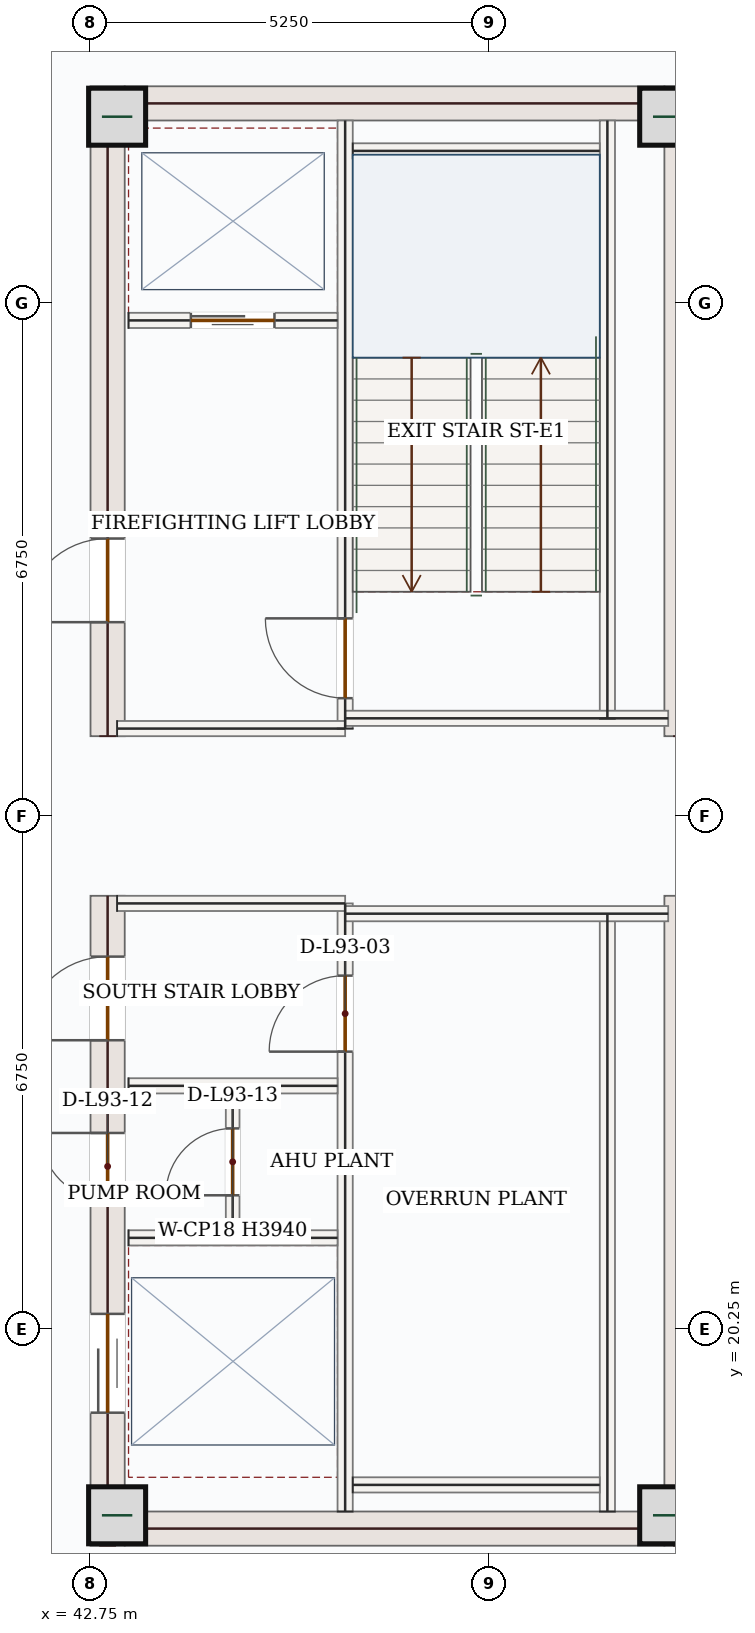
"""IFC4 building model, lengths in metres.
Left out: names, types, materials, properties, quantities, classifications, styles, units other than length and angle.
Written with IfcOpenShell. Run it as: python <this file> out.ifc"""

import sys

from ifc_helpers import new_model, si_unit, direction, frame, frame_2d, origin, origin_2d, place, context, subcontext, project, spatial, rectangle, extrude, source, transform, mapped, element, fill, save


model = new_model("IFC4")
c1 = context("Model", 3, precision=1e-05, world=origin(), true_north=direction((0.0, 1.0)))
c2 = subcontext(c1, "Body", "Model", "MODEL_VIEW")
j1 = project(units=[si_unit("LENGTHUNIT", "METRE"), si_unit("PLANEANGLEUNIT", "RADIAN")], contexts=[c1])
p1 = place(None, origin())
s1 = spatial("IfcSite", under=j1, at=p1, CompositionType="ELEMENT")
p2 = place(p1, origin())
s2 = spatial("IfcBuilding", under=s1, at=p2, CompositionType="ELEMENT")
p3 = place(p2, frame((0.0, 0.0, 383.85)))
s3 = spatial("IfcBuildingStorey", under=s2, at=p3, CompositionType="ELEMENT", Elevation=383.85)
p4 = place(p3, frame((42.975, 17.4, 0.0), z_axis=(0.0, 0.0, 1.0), x_axis=(0.0, 1.0, 0.0)))
e1 = element("IfcWall", 1, at=p4, inside=s3, PredefinedType="SHEAR", context=c2, shape_type="SweptSolid", body=[
    extrude(rectangle(XDim=8.55, YDim=0.45, at=frame_2d((4.275, 0.0))), origin(), (0.0, 0.0, 1.0), 3.94),
])
p5 = place(p4, frame((6.65, 0.0, 0.0)))
e2 = element("IfcOpeningElement", 2, at=p5, cuts=e1, PredefinedType="OPENING", context=c2, shape_type="SweptSolid", body=[
    extrude(rectangle(XDim=1.1, YDim=2.2, at=frame_2d((0.55, 1.1))), frame((0.0, 0.235, 0.0), z_axis=(0.0, -1.0, 0.0), x_axis=(1.0, 0.0, 0.0)), (0.0, 0.0, 1.0), 0.47),
])
p6 = place(p4, frame((1.75, 0.0, 0.0)))
e3 = element("IfcOpeningElement", 3, at=p6, cuts=e1, PredefinedType="OPENING", context=c2, shape_type="SweptSolid", body=[
    extrude(rectangle(XDim=1.3, YDim=2.2, at=frame_2d((0.65, 1.1))), frame((0.0, 0.235, 0.0), z_axis=(0.0, -1.0, 0.0), x_axis=(1.0, 0.0, 0.0)), (0.0, 0.0, 1.0), 0.47),
])
p7 = place(p4, frame((4.55, 0.0, 0.0)))
e4 = element("IfcOpeningElement", 4, at=p7, cuts=e1, PredefinedType="OPENING", context=c2, shape_type="SweptSolid", body=[
    extrude(rectangle(XDim=0.88, YDim=2.1, at=frame_2d((0.44, 1.05))), frame((0.0, 0.235, 0.0), z_axis=(0.0, -1.0, 0.0), x_axis=(1.0, 0.0, 0.0)), (0.0, 0.0, 1.0), 0.47),
])
p8 = place(p3, frame((42.975, 28.05, 0.0), z_axis=(0.0, 0.0, 1.0), x_axis=(0.0, 1.0, 0.0)))
e5 = element("IfcWall", 5, at=p8, inside=s3, PredefinedType="SHEAR", context=c2, shape_type="SweptSolid", body=[
    extrude(rectangle(XDim=8.55, YDim=0.45, at=frame_2d((4.275, 0.0))), origin(), (0.0, 0.0, 1.0), 3.94),
])
p9 = place(p8, frame((1.5, 0.0, 0.0)))
e6 = element("IfcOpeningElement", 6, at=p9, cuts=e5, PredefinedType="OPENING", context=c2, shape_type="SweptSolid", body=[
    extrude(rectangle(XDim=1.1, YDim=2.2, at=frame_2d((0.55, 1.1))), frame((0.0, 0.235, 0.0), z_axis=(0.0, -1.0, 0.0), x_axis=(1.0, 0.0, 0.0)), (0.0, 0.0, 1.0), 0.47),
])
m1 = source(origin(), c2, "Body", "SweptSolid", [
    extrude(rectangle(XDim=8.55, YDim=0.45, at=frame_2d((4.275, 0.0))), origin(), (0.0, 0.0, 1.0), 3.94),
])
for number, where, z_axis, x_axis in (
    (7, (50.525, 17.4, 0.0), (0.0, 0.0, 1.0), (0.0, 1.0, 0.0)),
    (8, (50.525, 28.05, 0.0), (0.0, 0.0, 1.0), (0.0, 1.0, 0.0)),
):
    element("IfcWall", number, at=place(p3, frame(where, z_axis=z_axis, x_axis=x_axis)), inside=s3, PredefinedType="SHEAR", context=c2, shape_type="MappedRepresentation", body=[
        mapped(m1, transform((0.0, 0.0, 0.0), x_axis=(1.0, 0.0, 0.0), y_axis=(0.0, 1.0, 0.0), z_axis=(0.0, 0.0, 1.0), scale=1.0)),
    ])
m2 = source(origin(), c2, "Body", "SweptSolid", [
    extrude(rectangle(XDim=7.1, YDim=0.45, at=frame_2d((3.55, 0.0))), origin(), (0.0, 0.0, 1.0), 3.94),
])
for number, where, z_axis, x_axis in (
    (9, (43.2, 17.625, 0.0), (0.0, 0.0, 1.0), (1.0, 0.0, 0.0)),
    (10, (43.2, 36.375, 0.0), (0.0, 0.0, 1.0), (1.0, 0.0, 0.0)),
):
    element("IfcWall", number, at=place(p3, frame(where, z_axis=z_axis, x_axis=x_axis)), inside=s3, PredefinedType="SHEAR", context=c2, shape_type="MappedRepresentation", body=[
        mapped(m2, transform((0.0, 0.0, 0.0), x_axis=(1.0, 0.0, 0.0), y_axis=(0.0, 1.0, 0.0), z_axis=(0.0, 0.0, 1.0), scale=1.0)),
    ])
m3 = source(origin(), c2, "Body", "SweptSolid", [
    extrude(rectangle(XDim=0.75, YDim=0.75, at=origin_2d()), origin(), (0.0, 0.0, 1.0), 4.2),
])
for number, where, z_axis, x_axis in (
    (11, (43.1, 17.8, 0.0), (0.0, 0.0, 1.0), (1.0, 0.0, 0.0)),
    (12, (50.35, 17.8, 0.0), (0.0, 0.0, 1.0), (1.0, 0.0, 0.0)),
    (13, (43.1, 36.2, 0.0), (0.0, 0.0, 1.0), (1.0, 0.0, 0.0)),
    (14, (50.35, 36.2, 0.0), (0.0, 0.0, 1.0), (1.0, 0.0, 0.0)),
):
    element("IfcColumn", number, at=place(p3, frame(where, z_axis=z_axis, x_axis=x_axis)), inside=s3, PredefinedType="COLUMN", context=c2, shape_type="MappedRepresentation", body=[
        mapped(m3, transform((0.0, 0.0, 0.0), x_axis=(1.0, 0.0, 0.0), y_axis=(0.0, 1.0, 0.0), z_axis=(0.0, 0.0, 1.0), scale=1.0)),
    ])
m4 = source(origin(), c2, "Body", "SweptSolid", [
    extrude(rectangle(XDim=5.258, YDim=0.26, at=frame_2d((2.629, 0.0))), origin(), (0.0, 0.0, 1.0), 3.94),
])
for number, where, z_axis, x_axis in (
    (15, (49.342, 39.26, 0.0), (0.0, 0.0, 1.0), (0.707, -0.707, 0.0)),
    (16, (53.06, 18.458, 0.0), (0.0, 0.0, 1.0), (-0.707, -0.707, 0.0)),
):
    element("IfcWall", number, at=place(p3, frame(where, z_axis=z_axis, x_axis=x_axis)), inside=s3, PredefinedType="SOLIDWALL", context=c2, shape_type="MappedRepresentation", body=[
        mapped(m4, transform((0.0, 0.0, 0.0), x_axis=(1.0, 0.0, 0.0), y_axis=(0.0, 1.0, 0.0), z_axis=(0.0, 0.0, 1.0), scale=1.0)),
    ])
m5 = source(origin(), c2, "Body", "SweptSolid", [
    extrude(rectangle(XDim=7.87, YDim=0.2, at=frame_2d((3.935, 0.0))), origin(), (0.0, 0.0, 1.0), 3.94),
])
for number, where, z_axis, x_axis in (
    (17, (49.55, 17.85, 0.0), (0.0, 0.0, 1.0), (0.0, 1.0, 0.0)),
    (18, (49.55, 28.28, 0.0), (0.0, 0.0, 1.0), (0.0, 1.0, 0.0)),
):
    element("IfcWall", number, at=place(p3, frame(where, z_axis=z_axis, x_axis=x_axis)), inside=s3, PredefinedType="SOLIDWALL", context=c2, shape_type="MappedRepresentation", body=[
        mapped(m5, transform((0.0, 0.0, 0.0), x_axis=(1.0, 0.0, 0.0), y_axis=(0.0, 1.0, 0.0), z_axis=(0.0, 0.0, 1.0), scale=1.0)),
    ])
p10 = place(p3, frame((46.1, 17.85, 0.0), z_axis=(0.0, 0.0, 1.0), x_axis=(0.0, 1.0, 0.0)))
e19 = element("IfcWall", 19, at=p10, inside=s3, PredefinedType="SOLIDWALL", context=c2, shape_type="SweptSolid", body=[
    extrude(rectangle(XDim=8.0, YDim=0.2, at=frame_2d((4.0, 0.0))), origin(), (0.0, 0.0, 1.0), 3.94),
])
p11 = place(p10, frame((6.05, 0.0, 0.0)))
e20 = element("IfcOpeningElement", 20, at=p11, cuts=e19, PredefinedType="OPENING", context=c2, shape_type="SweptSolid", body=[
    extrude(rectangle(XDim=1.0, YDim=2.15, at=frame_2d((0.5, 1.075))), frame((0.0, 0.11, 0.0), z_axis=(0.0, -1.0, 0.0), x_axis=(1.0, 0.0, 0.0)), (0.0, 0.0, 1.0), 0.22),
])
p12 = place(p3, frame((46.1, 28.15, 0.0), z_axis=(0.0, 0.0, 1.0), x_axis=(0.0, 1.0, 0.0)))
e21 = element("IfcWall", 21, at=p12, inside=s3, PredefinedType="SOLIDWALL", context=c2, shape_type="SweptSolid", body=[
    extrude(rectangle(XDim=8.0, YDim=0.2, at=frame_2d((4.0, 0.0))), origin(), (0.0, 0.0, 1.0), 3.94),
])
p13 = place(p12, frame((0.4, 0.0, 0.0)))
e22 = element("IfcOpeningElement", 22, at=p13, cuts=e21, PredefinedType="OPENING", context=c2, shape_type="SweptSolid", body=[
    extrude(rectangle(XDim=1.05, YDim=2.15, at=frame_2d((0.525, 1.075))), frame((0.0, 0.11, 0.0), z_axis=(0.0, -1.0, 0.0), x_axis=(1.0, 0.0, 0.0)), (0.0, 0.0, 1.0), 0.22),
])
m6 = source(origin(), c2, "Body", "SweptSolid", [
    extrude(rectangle(XDim=3.0, YDim=0.2, at=frame_2d((1.5, 0.0))), origin(), (0.0, 0.0, 1.0), 3.94),
])
p14 = place(p3, frame((43.1, 25.85, 0.0), z_axis=(0.0, 0.0, 1.0), x_axis=(1.0, 0.0, 0.0)))
e23 = element("IfcWall", 23, at=p14, inside=s3, PredefinedType="SOLIDWALL", context=c2, shape_type="MappedRepresentation", body=[
    mapped(m6, transform((0.0, 0.0, 0.0), x_axis=(1.0, 0.0, 0.0), y_axis=(0.0, 1.0, 0.0), z_axis=(0.0, 0.0, 1.0), scale=1.0)),
])
m7 = source(origin(), c2, "Body", "SweptSolid", [
    extrude(rectangle(XDim=4.25, YDim=0.2, at=frame_2d((2.125, 0.0))), origin(), (0.0, 0.0, 1.0), 3.94),
])
p15 = place(p3, frame((46.1, 25.715, 0.0), z_axis=(0.0, 0.0, 1.0), x_axis=(1.0, 0.0, 0.0)))
e24 = element("IfcWall", 24, at=p15, inside=s3, PredefinedType="SOLIDWALL", context=c2, shape_type="MappedRepresentation", body=[
    mapped(m7, transform((0.0, 0.0, 0.0), x_axis=(1.0, 0.0, 0.0), y_axis=(0.0, 1.0, 0.0), z_axis=(0.0, 0.0, 1.0), scale=1.0)),
])
p16 = place(p3, frame((43.1, 28.15, 0.0), z_axis=(0.0, 0.0, 1.0), x_axis=(1.0, 0.0, 0.0)))
e25 = element("IfcWall", 25, at=p16, inside=s3, PredefinedType="SOLIDWALL", context=c2, shape_type="MappedRepresentation", body=[
    mapped(m6, transform((0.0, 0.0, 0.0), x_axis=(1.0, 0.0, 0.0), y_axis=(0.0, 1.0, 0.0), z_axis=(0.0, 0.0, 1.0), scale=1.0)),
])
p17 = place(p3, frame((46.1, 28.285, 0.0), z_axis=(0.0, 0.0, 1.0), x_axis=(1.0, 0.0, 0.0)))
e26 = element("IfcWall", 26, at=p17, inside=s3, PredefinedType="SOLIDWALL", context=c2, shape_type="MappedRepresentation", body=[
    mapped(m7, transform((0.0, 0.0, 0.0), x_axis=(1.0, 0.0, 0.0), y_axis=(0.0, 1.0, 0.0), z_axis=(0.0, 0.0, 1.0), scale=1.0)),
])
m8 = source(origin(), c2, "Body", "SweptSolid", [
    extrude(rectangle(XDim=3.25, YDim=0.2, at=frame_2d((1.625, 0.0))), origin(), (0.0, 0.0, 1.0), 3.94),
])
for number, where, z_axis, x_axis in (
    (27, (46.2, 35.75, 0.0), (0.0, 0.0, 1.0), (1.0, 0.0, 0.0)),
    (28, (46.2, 18.2, 0.0), (0.0, 0.0, 1.0), (1.0, 0.0, 0.0)),
):
    element("IfcWall", number, at=place(p3, frame(where, z_axis=z_axis, x_axis=x_axis)), inside=s3, PredefinedType="SOLIDWALL", context=c2, shape_type="MappedRepresentation", body=[
        mapped(m8, transform((0.0, 0.0, 0.0), x_axis=(1.0, 0.0, 0.0), y_axis=(0.0, 1.0, 0.0), z_axis=(0.0, 0.0, 1.0), scale=1.0)),
    ])
p18 = place(p3, frame((43.25, 33.52, 0.0), z_axis=(0.0, 0.0, 1.0), x_axis=(1.0, 0.0, 0.0)))
e29 = element("IfcWall", 29, at=p18, inside=s3, PredefinedType="SOLIDWALL", context=c2, shape_type="SweptSolid", body=[
    extrude(rectangle(XDim=2.75, YDim=0.2, at=frame_2d((1.375, 0.0))), origin(), (0.0, 0.0, 1.0), 3.94),
])
p19 = place(p18, frame((0.82, 0.0, 0.0)))
e30 = element("IfcOpeningElement", 30, at=p19, cuts=e29, PredefinedType="OPENING", context=c2, shape_type="SweptSolid", body=[
    extrude(rectangle(XDim=1.1, YDim=2.15, at=frame_2d((0.55, 1.075))), frame((0.0, 0.11, 0.0), z_axis=(0.0, -1.0, 0.0), x_axis=(1.0, 0.0, 0.0)), (0.0, 0.0, 1.0), 0.22),
])
m9 = source(origin(), c2, "Body", "SweptSolid", [
    extrude(rectangle(XDim=2.75, YDim=0.2, at=frame_2d((1.375, 0.0))), origin(), (0.0, 0.0, 1.0), 3.94),
])
for number, where, z_axis, x_axis in (
    (31, (43.25, 23.45, 0.0), (0.0, 0.0, 1.0), (1.0, 0.0, 0.0)),
    (32, (43.25, 21.45, 0.0), (0.0, 0.0, 1.0), (1.0, 0.0, 0.0)),
):
    element("IfcWall", number, at=place(p3, frame(where, z_axis=z_axis, x_axis=x_axis)), inside=s3, PredefinedType="SOLIDWALL", context=c2, shape_type="MappedRepresentation", body=[
        mapped(m9, transform((0.0, 0.0, 0.0), x_axis=(1.0, 0.0, 0.0), y_axis=(0.0, 1.0, 0.0), z_axis=(0.0, 0.0, 1.0), scale=1.0)),
    ])
p20 = place(p3, frame((44.62, 21.55, 0.0), z_axis=(0.0, 0.0, 1.0), x_axis=(0.0, 1.0, 0.0)))
e33 = element("IfcWall", 33, at=p20, inside=s3, PredefinedType="PARTITIONING", context=c2, shape_type="SweptSolid", body=[
    extrude(rectangle(XDim=1.8, YDim=0.18, at=frame_2d((0.9, 0.0))), origin(), (0.0, 0.0, 1.0), 3.94),
])
p21 = place(p20, frame((0.46, 0.0, 0.0)))
e34 = element("IfcOpeningElement", 34, at=p21, cuts=e33, PredefinedType="OPENING", context=c2, shape_type="SweptSolid", body=[
    extrude(rectangle(XDim=0.88, YDim=2.1, at=frame_2d((0.44, 1.05))), frame((0.0, 0.1, 0.0), z_axis=(0.0, -1.0, 0.0), x_axis=(1.0, 0.0, 0.0)), (0.0, 0.0, 1.0), 0.2),
])
m10 = source(origin(), c2, "Body", "SweptSolid", [
    extrude(rectangle(XDim=1.05, YDim=2.15, at=frame_2d((0.525, 1.075))), frame((0.0, 0.025, 0.0), z_axis=(0.0, -1.0, 0.0), x_axis=(1.0, 0.0, 0.0)), (0.0, 0.0, 1.0), 0.05),
])
p22 = place(p13, origin())
e35 = element("IfcDoor", 35, at=p22, inside=s3, OperationType="SINGLE_SWING_RIGHT", PredefinedType="DOOR", context=c2, shape_type="MappedRepresentation", body=[
    mapped(m10, transform((0.0, 0.0, 0.0), x_axis=(1.0, 0.0, 0.0), y_axis=(0.0, 1.0, 0.0), z_axis=(0.0, 0.0, 1.0), scale=1.0)),
])
fill(e22, e35)
m11 = source(origin(), c2, "Body", "SweptSolid", [
    extrude(rectangle(XDim=1.0, YDim=2.15, at=frame_2d((0.5, 1.075))), frame((0.0, 0.025, 0.0), z_axis=(0.0, -1.0, 0.0), x_axis=(1.0, 0.0, 0.0)), (0.0, 0.0, 1.0), 0.05),
])
p23 = place(p11, origin())
e36 = element("IfcDoor", 36, at=p23, inside=s3, OperationType="SINGLE_SWING_LEFT", PredefinedType="DOOR", context=c2, shape_type="MappedRepresentation", body=[
    mapped(m11, transform((0.0, 0.0, 0.0), x_axis=(1.0, 0.0, 0.0), y_axis=(0.0, 1.0, 0.0), z_axis=(0.0, 0.0, 1.0), scale=1.0)),
])
fill(e20, e36)
m12 = source(origin(), c2, "Body", "SweptSolid", [
    extrude(rectangle(XDim=1.1, YDim=2.15, at=frame_2d((0.55, 1.075))), frame((0.0, 0.025, 0.0), z_axis=(0.0, -1.0, 0.0), x_axis=(1.0, 0.0, 0.0)), (0.0, 0.0, 1.0), 0.05),
])
p24 = place(p19, origin())
e37 = element("IfcDoor", 37, at=p24, inside=s3, OperationType="DOUBLE_DOOR_SLIDING", PredefinedType="DOOR", context=c2, shape_type="MappedRepresentation", body=[
    mapped(m12, transform((0.0, 0.0, 0.0), x_axis=(1.0, 0.0, 0.0), y_axis=(0.0, 1.0, 0.0), z_axis=(0.0, 0.0, 1.0), scale=1.0)),
])
fill(e30, e37)
m13 = source(origin(), c2, "Body", "SweptSolid", [
    extrude(rectangle(XDim=1.1, YDim=2.2, at=frame_2d((0.55, 1.1))), frame((0.0, 0.025, 0.0), z_axis=(0.0, -1.0, 0.0), x_axis=(1.0, 0.0, 0.0)), (0.0, 0.0, 1.0), 0.05),
])
p25 = place(p9, origin())
e38 = element("IfcDoor", 38, at=p25, inside=s3, OperationType="SINGLE_SWING_LEFT", PredefinedType="DOOR", context=c2, shape_type="MappedRepresentation", body=[
    mapped(m13, transform((0.0, 0.0, 0.0), x_axis=(1.0, 0.0, 0.0), y_axis=(0.0, 1.0, 0.0), z_axis=(0.0, 0.0, 1.0), scale=1.0)),
])
fill(e6, e38)
p26 = place(p5, origin())
e39 = element("IfcDoor", 39, at=p26, inside=s3, OperationType="SINGLE_SWING_LEFT", PredefinedType="DOOR", context=c2, shape_type="MappedRepresentation", body=[
    mapped(m13, transform((0.0, 0.0, 0.0), x_axis=(1.0, 0.0, 0.0), y_axis=(0.0, 1.0, 0.0), z_axis=(0.0, 0.0, 1.0), scale=1.0)),
])
fill(e2, e39)
m14 = source(origin(), c2, "Body", "SweptSolid", [
    extrude(rectangle(XDim=1.3, YDim=2.2, at=frame_2d((0.65, 1.1))), frame((0.0, 0.025, 0.0), z_axis=(0.0, -1.0, 0.0), x_axis=(1.0, 0.0, 0.0)), (0.0, 0.0, 1.0), 0.05),
])
p27 = place(p6, origin())
e40 = element("IfcDoor", 40, at=p27, inside=s3, OperationType="DOUBLE_DOOR_SLIDING", PredefinedType="DOOR", context=c2, shape_type="MappedRepresentation", body=[
    mapped(m14, transform((0.0, 0.0, 0.0), x_axis=(1.0, 0.0, 0.0), y_axis=(0.0, 1.0, 0.0), z_axis=(0.0, 0.0, 1.0), scale=1.0)),
])
fill(e3, e40)
m15 = source(origin(), c2, "Body", "SweptSolid", [
    extrude(rectangle(XDim=0.88, YDim=2.1, at=frame_2d((0.44, 1.05))), frame((0.0, 0.025, 0.0), z_axis=(0.0, -1.0, 0.0), x_axis=(1.0, 0.0, 0.0)), (0.0, 0.0, 1.0), 0.05),
])
p28 = place(p7, origin())
e41 = element("IfcDoor", 41, at=p28, inside=s3, OperationType="SINGLE_SWING_RIGHT", PredefinedType="DOOR", context=c2, shape_type="MappedRepresentation", body=[
    mapped(m15, transform((0.0, 0.0, 0.0), x_axis=(1.0, 0.0, 0.0), y_axis=(0.0, 1.0, 0.0), z_axis=(0.0, 0.0, 1.0), scale=1.0)),
])
fill(e4, e41)
p29 = place(p21, origin())
e42 = element("IfcDoor", 42, at=p29, inside=s3, OperationType="SINGLE_SWING_LEFT", PredefinedType="DOOR", context=c2, shape_type="MappedRepresentation", body=[
    mapped(m15, transform((0.0, 0.0, 0.0), x_axis=(1.0, 0.0, 0.0), y_axis=(0.0, 1.0, 0.0), z_axis=(0.0, 0.0, 1.0), scale=1.0)),
])
fill(e34, e42)
save(model, sys.argv[1])
